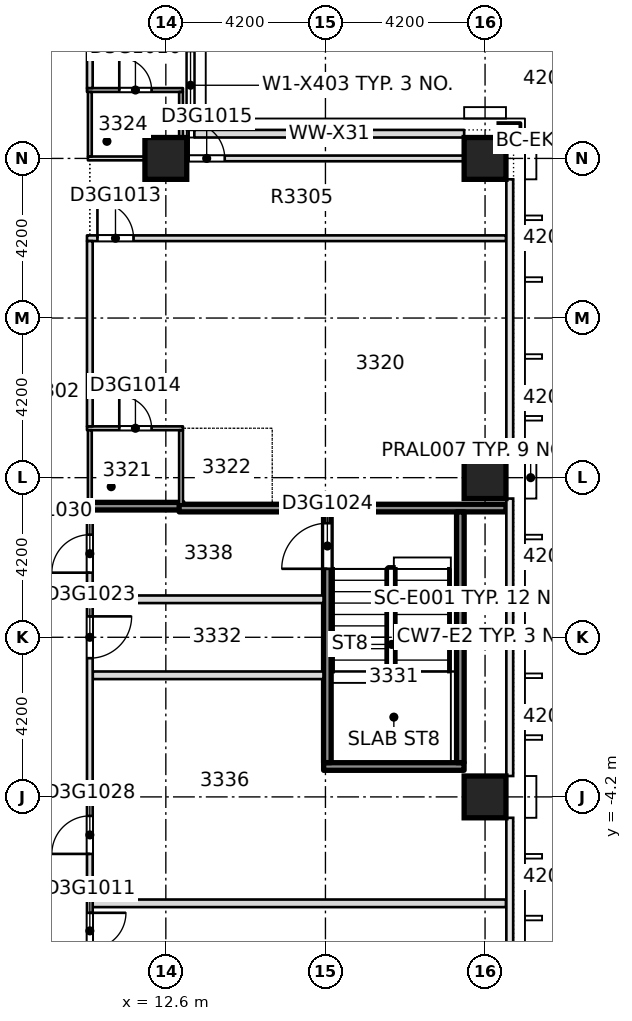
"""IFC4 building model, lengths in metres.
Left out: names, types, materials, properties, quantities, classifications, styles, units other than length and angle.
Written with IfcOpenShell. Run it as: python <this file> out.ifc"""

import sys

from ifc_helpers import new_model, si_unit, direction, frame, frame_2d, origin, origin_2d, place, context, subcontext, project, spatial, rectangle, extrude, element, fill, save


model = new_model("IFC4")
c1 = context("Model", 3, precision=1e-05, world=origin(), true_north=direction((0.0, 1.0)))
c2 = subcontext(c1, "Body", "Model", "MODEL_VIEW")
j1 = project(units=[si_unit("LENGTHUNIT", "METRE"), si_unit("PLANEANGLEUNIT", "RADIAN")], contexts=[c1])
p1 = place(None, origin())
s1 = spatial("IfcSite", under=j1, at=p1, CompositionType="ELEMENT")
p2 = place(p1, origin())
s2 = spatial("IfcBuilding", under=s1, at=p2, CompositionType="ELEMENT")
p3 = place(p2, frame((0.0, 0.0, 133.1)))
s3 = spatial("IfcBuildingStorey", under=s2, at=p3, CompositionType="ELEMENT", Elevation=133.1)
for number, where, z_axis, x_axis in (
    (1, (21.0, -4.2, -0.4), (0.0, 0.0, 1.0), (1.0, 0.0, 0.0)),
    (2, (21.0, 4.2, -0.4), (0.0, 0.0, 1.0), (1.0, 0.0, 0.0)),
    (3, (12.6, 12.6, -0.4), (0.0, 0.0, 1.0), (1.0, 0.0, 0.0)),
    (4, (21.0, 12.6, -0.4), (0.0, 0.0, 1.0), (1.0, 0.0, 0.0)),
):
    element("IfcColumn", number, at=place(p3, frame(where, z_axis=z_axis, x_axis=x_axis)), inside=s3, PredefinedType="COLUMN", context=c2, shape_type="SweptSolid", body=[
        extrude(rectangle(XDim=1.1, YDim=1.1, at=origin_2d()), origin(), (0.0, 0.0, 1.0), 3.45),
    ])
p4 = place(p3, frame((10.675, -7.0, 0.0), z_axis=(0.0, 0.0, 1.0), x_axis=(1.0, 0.0, 0.0)))
e5 = element("IfcWall", 5, at=p4, inside=s3, PredefinedType="PARTITIONING", context=c2, shape_type="SweptSolid", body=[
    extrude(rectangle(XDim=10.875, YDim=0.2, at=frame_2d((5.438, 0.0))), origin(), (0.0, 0.0, 1.0), 3.05),
])
p5 = place(p3, frame((16.752, -3.4, 0.0), z_axis=(0.0, 0.0, 1.0), x_axis=(1.0, 0.0, 0.0)))
e6 = element("IfcWall", 6, at=p5, inside=s3, PredefinedType="SOLIDWALL", context=c2, shape_type="SweptSolid", body=[
    extrude(rectangle(XDim=3.696, YDim=0.2, at=frame_2d((1.848, 0.0))), origin(), (0.0, 0.0, 1.0), 3.05),
])
p6 = place(p3, frame((10.677, -1.0, 0.0), z_axis=(0.0, 0.0, 1.0), x_axis=(1.0, 0.0, 0.0)))
e7 = element("IfcWall", 7, at=p6, inside=s3, PredefinedType="PARTITIONING", context=c2, shape_type="SweptSolid", body=[
    extrude(rectangle(XDim=6.071, YDim=0.2, at=frame_2d((3.036, 0.0))), origin(), (0.0, 0.0, 1.0), 3.05),
])
p7 = place(p3, frame((10.675, 1.0, 0.0), z_axis=(0.0, 0.0, 1.0), x_axis=(1.0, 0.0, 0.0)))
e8 = element("IfcWall", 8, at=p7, inside=s3, PredefinedType="PARTITIONING", context=c2, shape_type="SweptSolid", body=[
    extrude(rectangle(XDim=6.075, YDim=0.2, at=frame_2d((3.038, 0.0))), origin(), (0.0, 0.0, 1.0), 3.05),
])
p8 = place(p3, frame((10.525, 3.45, 0.0), z_axis=(0.0, 0.0, 1.0), x_axis=(1.0, 0.0, 0.0)))
e9 = element("IfcWall", 9, at=p8, inside=s3, PredefinedType="SOLIDWALL", context=c2, shape_type="SweptSolid", body=[
    extrude(rectangle(XDim=2.525, YDim=0.2, at=frame_2d((1.263, 0.0))), origin(), (0.0, 0.0, 1.0), 3.05),
])
p9 = place(p3, frame((12.95, 3.4, 0.0), z_axis=(0.0, 0.0, 1.0), x_axis=(1.0, 0.0, 0.0)))
e10 = element("IfcWall", 10, at=p9, inside=s3, PredefinedType="SOLIDWALL", context=c2, shape_type="SweptSolid", body=[
    extrude(rectangle(XDim=8.6, YDim=0.2, at=frame_2d((4.3, 0.0))), origin(), (0.0, 0.0, 1.0), 3.05),
])
p10 = place(p3, frame((10.525, 5.5, 0.0), z_axis=(0.0, 0.0, 1.0), x_axis=(1.0, 0.0, 0.0)))
e11 = element("IfcWall", 11, at=p10, inside=s3, PredefinedType="PARTITIONING", context=c2, shape_type="SweptSolid", body=[
    extrude(rectangle(XDim=2.525, YDim=0.1, at=frame_2d((1.263, 0.0))), origin(), (0.0, 0.0, 1.0), 3.05),
])
p11 = place(p10, frame((0.85, 0.0, 0.0)))
e12 = element("IfcOpeningElement", 12, at=p11, cuts=e11, PredefinedType="OPENING", context=c2, shape_type="SweptSolid", body=[
    extrude(rectangle(XDim=0.85, YDim=2.1, at=frame_2d((0.425, 1.05))), frame((0.0, 0.06, 0.0), z_axis=(0.0, -1.0, 0.0), x_axis=(1.0, 0.0, 0.0)), (0.0, 0.0, 1.0), 0.12),
])
p12 = place(p3, frame((10.525, 10.5, 0.0), z_axis=(0.0, 0.0, 1.0), x_axis=(1.0, 0.0, 0.0)))
e13 = element("IfcWall", 13, at=p12, inside=s3, PredefinedType="PARTITIONING", context=c2, shape_type="SweptSolid", body=[
    extrude(rectangle(XDim=11.025, YDim=0.15, at=frame_2d((5.513, 0.0))), origin(), (0.0, 0.0, 1.0), 3.05),
])
p13 = place(p12, frame((0.275, 0.0, 0.0)))
e14 = element("IfcOpeningElement", 14, at=p13, cuts=e13, PredefinedType="OPENING", context=c2, shape_type="SweptSolid", body=[
    extrude(rectangle(XDim=0.95, YDim=2.1, at=frame_2d((0.475, 1.05))), frame((0.0, 0.085, 0.0), z_axis=(0.0, -1.0, 0.0), x_axis=(1.0, 0.0, 0.0)), (0.0, 0.0, 1.0), 0.17),
])
p14 = place(p3, frame((10.55, 12.6, 0.0), z_axis=(0.0, 0.0, 1.0), x_axis=(1.0, 0.0, 0.0)))
e15 = element("IfcWall", 15, at=p14, inside=s3, PredefinedType="PARTITIONING", context=c2, shape_type="SweptSolid", body=[
    extrude(rectangle(XDim=2.5, YDim=0.1, at=frame_2d((1.25, 0.0))), origin(), (0.0, 0.0, 1.0), 3.05),
])
p15 = place(p3, frame((12.95, 12.6, 0.0), z_axis=(0.0, 0.0, 1.0), x_axis=(1.0, 0.0, 0.0)))
e16 = element("IfcWall", 16, at=p15, inside=s3, PredefinedType="PARTITIONING", context=c2, shape_type="SweptSolid", body=[
    extrude(rectangle(XDim=0.2, YDim=0.15, at=frame_2d((0.1, 0.0))), origin(), (0.0, 0.0, 1.0), 3.05),
])
p16 = place(p3, frame((10.525, 14.4, 0.0), z_axis=(0.0, 0.0, 1.0), x_axis=(1.0, 0.0, 0.0)))
e17 = element("IfcWall", 17, at=p16, inside=s3, PredefinedType="PARTITIONING", context=c2, shape_type="SweptSolid", body=[
    extrude(rectangle(XDim=2.525, YDim=0.1, at=frame_2d((1.263, 0.0))), origin(), (0.0, 0.0, 1.0), 3.05),
])
p17 = place(p16, frame((0.85, 0.0, 0.0)))
e18 = element("IfcOpeningElement", 18, at=p17, cuts=e17, PredefinedType="OPENING", context=c2, shape_type="SweptSolid", body=[
    extrude(rectangle(XDim=0.85, YDim=2.1, at=frame_2d((0.425, 1.05))), frame((0.0, 0.06, 0.0), z_axis=(0.0, -1.0, 0.0), x_axis=(1.0, 0.0, 0.0)), (0.0, 0.0, 1.0), 0.12),
])
p18 = place(p3, frame((10.6, -10.29, 0.0), z_axis=(0.0, 0.0, 1.0), x_axis=(0.0, 1.0, 0.0)))
e19 = element("IfcWall", 19, at=p18, inside=s3, PredefinedType="PARTITIONING", context=c2, shape_type="SweptSolid", body=[
    extrude(rectangle(XDim=13.64, YDim=0.15, at=frame_2d((6.82, 0.0))), origin(), (0.0, 0.0, 1.0), 3.05),
])
p19 = place(p18, frame((2.09, 0.0, 0.0)))
e20 = element("IfcOpeningElement", 20, at=p19, cuts=e19, PredefinedType="OPENING", context=c2, shape_type="SweptSolid", body=[
    extrude(rectangle(XDim=0.95, YDim=2.1, at=frame_2d((0.475, 1.05))), frame((0.0, 0.085, 0.0), z_axis=(0.0, -1.0, 0.0), x_axis=(1.0, 0.0, 0.0)), (0.0, 0.0, 1.0), 0.17),
])
p20 = place(p18, frame((9.74, 0.0, 0.0)))
e21 = element("IfcOpeningElement", 21, at=p20, cuts=e19, PredefinedType="OPENING", context=c2, shape_type="SweptSolid", body=[
    extrude(rectangle(XDim=1.1, YDim=2.1, at=frame_2d((0.55, 1.05))), frame((0.0, 0.085, 0.0), z_axis=(0.0, -1.0, 0.0), x_axis=(1.0, 0.0, 0.0)), (0.0, 0.0, 1.0), 0.17),
])
p21 = place(p18, frame((4.59, 0.0, 0.0)))
e22 = element("IfcOpeningElement", 22, at=p21, cuts=e19, PredefinedType="OPENING", context=c2, shape_type="SweptSolid", body=[
    extrude(rectangle(XDim=1.0, YDim=2.1, at=frame_2d((0.5, 1.05))), frame((0.0, 0.085, 0.0), z_axis=(0.0, -1.0, 0.0), x_axis=(1.0, 0.0, 0.0)), (0.0, 0.0, 1.0), 0.17),
])
p22 = place(p18, frame((11.99, 0.0, 0.0)))
e23 = element("IfcOpeningElement", 23, at=p22, cuts=e19, PredefinedType="OPENING", context=c2, shape_type="SweptSolid", body=[
    extrude(rectangle(XDim=1.0, YDim=2.1, at=frame_2d((0.5, 1.05))), frame((0.0, 0.085, 0.0), z_axis=(0.0, -1.0, 0.0), x_axis=(1.0, 0.0, 0.0)), (0.0, 0.0, 1.0), 0.17),
])
p23 = place(p3, frame((10.6, 3.45, 0.0), z_axis=(0.0, 0.0, 1.0), x_axis=(0.0, 1.0, 0.0)))
e24 = element("IfcWall", 24, at=p23, inside=s3, PredefinedType="PARTITIONING", context=c2, shape_type="SweptSolid", body=[
    extrude(rectangle(XDim=2.0, YDim=0.1, at=frame_2d((1.0, 0.0))), origin(), (0.0, 0.0, 1.0), 3.05),
])
p24 = place(p3, frame((10.6, 5.55, 0.0), z_axis=(0.0, 0.0, 1.0), x_axis=(0.0, 1.0, 0.0)))
e25 = element("IfcWall", 25, at=p24, inside=s3, PredefinedType="PARTITIONING", context=c2, shape_type="SweptSolid", body=[
    extrude(rectangle(XDim=4.875, YDim=0.15, at=frame_2d((2.438, 0.0))), origin(), (0.0, 0.0, 1.0), 3.05),
])
p25 = place(p3, frame((10.6, 12.65, 0.0), z_axis=(0.0, 0.0, 1.0), x_axis=(0.0, 1.0, 0.0)))
e26 = element("IfcWall", 26, at=p25, inside=s3, PredefinedType="PARTITIONING", context=c2, shape_type="SweptSolid", body=[
    extrude(rectangle(XDim=1.7, YDim=0.1, at=frame_2d((0.85, 0.0))), origin(), (0.0, 0.0, 1.0), 3.05),
])
p26 = place(p3, frame((10.6, 14.45, 0.0), z_axis=(0.0, 0.0, 1.0), x_axis=(0.0, 1.0, 0.0)))
e27 = element("IfcWall", 27, at=p26, inside=s3, PredefinedType="PARTITIONING", context=c2, shape_type="SweptSolid", body=[
    extrude(rectangle(XDim=7.1, YDim=0.15, at=frame_2d((3.55, 0.0))), origin(), (0.0, 0.0, 1.0), 3.05),
])
p27 = place(p3, frame((13.0, 3.5, 0.0), z_axis=(0.0, 0.0, 1.0), x_axis=(0.0, 1.0, 0.0)))
e28 = element("IfcWall", 28, at=p27, inside=s3, PredefinedType="PARTITIONING", context=c2, shape_type="SweptSolid", body=[
    extrude(rectangle(XDim=1.95, YDim=0.1, at=frame_2d((0.975, 0.0))), origin(), (0.0, 0.0, 1.0), 3.05),
])
p28 = place(p3, frame((13.0, 12.675, 0.0), z_axis=(0.0, 0.0, 1.0), x_axis=(0.0, 1.0, 0.0)))
e29 = element("IfcWall", 29, at=p28, inside=s3, PredefinedType="PARTITIONING", context=c2, shape_type="SweptSolid", body=[
    extrude(rectangle(XDim=1.675, YDim=0.1, at=frame_2d((0.837, 0.0))), origin(), (0.0, 0.0, 1.0), 3.05),
])
p29 = place(p3, frame((16.85, -3.298, 0.0), z_axis=(0.0, 0.0, 1.0), x_axis=(0.0, 1.0, 0.0)))
e30 = element("IfcWall", 30, at=p29, inside=s3, PredefinedType="SOLIDWALL", context=c2, shape_type="SweptSolid", body=[
    extrude(rectangle(XDim=6.598, YDim=0.2, at=frame_2d((3.299, 0.0))), origin(), (0.0, 0.0, 1.0), 3.05),
])
p30 = place(p29, frame((5.1, 0.0, 0.0)))
e31 = element("IfcOpeningElement", 31, at=p30, cuts=e30, PredefinedType="OPENING", context=c2, shape_type="SweptSolid", body=[
    extrude(rectangle(XDim=1.2, YDim=2.1, at=frame_2d((0.6, 1.05))), frame((0.0, 0.11, 0.0), z_axis=(0.0, -1.0, 0.0), x_axis=(1.0, 0.0, 0.0)), (0.0, 0.0, 1.0), 0.22),
])
p31 = place(p3, frame((20.35, -3.298, 0.0), z_axis=(0.0, 0.0, 1.0), x_axis=(0.0, 1.0, 0.0)))
e32 = element("IfcWall", 32, at=p31, inside=s3, PredefinedType="SOLIDWALL", context=c2, shape_type="SweptSolid", body=[
    extrude(rectangle(XDim=6.596, YDim=0.2, at=frame_2d((3.298, 0.0))), origin(), (0.0, 0.0, 1.0), 3.05),
])
p32 = place(p3, frame((20.45, 13.25, 0.0), z_axis=(0.0, 0.0, 1.0), x_axis=(-1.0, 0.0, 0.0)))
e33 = element("IfcWall", 33, at=p32, inside=s3, PredefinedType="STANDARD", context=c2, shape_type="SweptSolid", body=[
    extrude(rectangle(XDim=7.1, YDim=0.2, at=frame_2d((3.55, 0.0))), origin(), (0.0, 0.0, 1.0), 3.05),
])
p33 = place(p3, frame((13.25, 13.35, 0.0), z_axis=(0.0, 0.0, 1.0), x_axis=(0.0, 1.0, 0.0)))
e34 = element("IfcWall", 34, at=p33, inside=s3, PredefinedType="STANDARD", context=c2, shape_type="SweptSolid", body=[
    extrude(rectangle(XDim=7.1, YDim=0.2, at=frame_2d((3.55, 0.0))), origin(), (0.0, 0.0, 1.0), 3.05),
])
p34 = place(p33, frame((0.275, 0.0, 0.2)))
e35 = element("IfcOpeningElement", 35, at=p34, cuts=e34, PredefinedType="OPENING", context=c2, shape_type="SweptSolid", body=[
    extrude(rectangle(XDim=1.8, YDim=2.65, at=frame_2d((0.9, 1.325))), frame((0.0, 0.11, 0.0), z_axis=(0.0, -1.0, 0.0), x_axis=(1.0, 0.0, 0.0)), (0.0, 0.0, 1.0), 0.22),
])
p35 = place(p33, frame((3.825, 0.0, 0.2)))
e36 = element("IfcOpeningElement", 36, at=p35, cuts=e34, PredefinedType="OPENING", context=c2, shape_type="SweptSolid", body=[
    extrude(rectangle(XDim=1.8, YDim=2.65, at=frame_2d((0.9, 1.325))), frame((0.0, 0.11, 0.0), z_axis=(0.0, -1.0, 0.0), x_axis=(1.0, 0.0, 0.0)), (0.0, 0.0, 1.0), 0.22),
])
p36 = place(p3, frame((13.15, 12.6, 0.0), z_axis=(0.0, 0.0, 1.0), x_axis=(1.0, 0.0, 0.0)))
e37 = element("IfcWall", 37, at=p36, inside=s3, PredefinedType="PARTITIONING", context=c2, shape_type="SweptSolid", body=[
    extrude(rectangle(XDim=7.3, YDim=0.15, at=frame_2d((3.65, 0.0))), origin(), (0.0, 0.0, 1.0), 2.5),
])
p37 = place(p36, frame((0.05, 0.0, 0.0)))
e38 = element("IfcOpeningElement", 38, at=p37, cuts=e37, PredefinedType="OPENING", context=c2, shape_type="SweptSolid", body=[
    extrude(rectangle(XDim=0.95, YDim=2.1, at=frame_2d((0.475, 1.05))), frame((0.0, 0.085, 0.0), z_axis=(0.0, -1.0, 0.0), x_axis=(1.0, 0.0, 0.0)), (0.0, 0.0, 1.0), 0.17),
])
p38 = place(p3, frame((20.45, 12.6, 0.0), z_axis=(0.0, 0.0, 1.0), x_axis=(1.0, 0.0, 0.0)))
e39 = element("IfcWall", 39, at=p38, inside=s3, PredefinedType="PARTITIONING", context=c2, shape_type="SweptSolid", body=[
    extrude(rectangle(XDim=1.1, YDim=0.15, at=frame_2d((0.55, 0.0))), origin(), (0.0, 0.0, 1.0), 3.05),
])
p39 = place(p19, origin())
e40 = element("IfcDoor", 40, at=p39, inside=s3, OperationType="SINGLE_SWING_LEFT", PredefinedType="DOOR", context=c2, shape_type="SweptSolid", body=[
    extrude(rectangle(XDim=0.95, YDim=2.1, at=frame_2d((0.475, 1.05))), frame((0.0, 0.025, 0.0), z_axis=(0.0, -1.0, 0.0), x_axis=(1.0, 0.0, 0.0)), (0.0, 0.0, 1.0), 0.05),
])
fill(e20, e40)
p40 = place(p13, origin())
e41 = element("IfcDoor", 41, at=p40, inside=s3, OperationType="SINGLE_SWING_RIGHT", PredefinedType="DOOR", context=c2, shape_type="SweptSolid", body=[
    extrude(rectangle(XDim=0.95, YDim=2.1, at=frame_2d((0.475, 1.05))), frame((0.0, 0.025, 0.0), z_axis=(0.0, -1.0, 0.0), x_axis=(1.0, 0.0, 0.0)), (0.0, 0.0, 1.0), 0.05),
])
fill(e14, e41)
p41 = place(p11, origin())
e42 = element("IfcDoor", 42, at=p41, inside=s3, OperationType="SINGLE_SWING_RIGHT", PredefinedType="DOOR", context=c2, shape_type="SweptSolid", body=[
    extrude(rectangle(XDim=0.85, YDim=2.1, at=frame_2d((0.425, 1.05))), frame((0.0, 0.025, 0.0), z_axis=(0.0, -1.0, 0.0), x_axis=(1.0, 0.0, 0.0)), (0.0, 0.0, 1.0), 0.05),
])
fill(e12, e42)
p42 = place(p37, origin())
e43 = element("IfcDoor", 43, at=p42, inside=s3, OperationType="SINGLE_SWING_LEFT", PredefinedType="DOOR", context=c2, shape_type="SweptSolid", body=[
    extrude(rectangle(XDim=0.95, YDim=2.1, at=frame_2d((0.475, 1.05))), frame((0.0, 0.025, 0.0), z_axis=(0.0, -1.0, 0.0), x_axis=(1.0, 0.0, 0.0)), (0.0, 0.0, 1.0), 0.05),
])
fill(e38, e43)
p43 = place(p17, origin())
e44 = element("IfcDoor", 44, at=p43, inside=s3, OperationType="SINGLE_SWING_RIGHT", PredefinedType="DOOR", context=c2, shape_type="SweptSolid", body=[
    extrude(rectangle(XDim=0.85, YDim=2.1, at=frame_2d((0.425, 1.05))), frame((0.0, 0.025, 0.0), z_axis=(0.0, -1.0, 0.0), x_axis=(1.0, 0.0, 0.0)), (0.0, 0.0, 1.0), 0.05),
])
fill(e18, e44)
p44 = place(p20, origin())
e45 = element("IfcDoor", 45, at=p44, inside=s3, OperationType="SINGLE_SWING_LEFT", PredefinedType="DOOR", context=c2, shape_type="SweptSolid", body=[
    extrude(rectangle(XDim=1.1, YDim=2.1, at=frame_2d((0.55, 1.05))), frame((0.0, 0.025, 0.0), z_axis=(0.0, -1.0, 0.0), x_axis=(1.0, 0.0, 0.0)), (0.0, 0.0, 1.0), 0.05),
])
fill(e21, e45)
p45 = place(p30, origin())
e46 = element("IfcDoor", 46, at=p45, inside=s3, OperationType="SINGLE_SWING_LEFT", PredefinedType="DOOR", context=c2, shape_type="SweptSolid", body=[
    extrude(rectangle(XDim=1.2, YDim=2.1, at=frame_2d((0.6, 1.05))), frame((0.0, 0.025, 0.0), z_axis=(0.0, -1.0, 0.0), x_axis=(1.0, 0.0, 0.0)), (0.0, 0.0, 1.0), 0.05),
])
fill(e31, e46)
p46 = place(p21, origin())
e47 = element("IfcDoor", 47, at=p46, inside=s3, OperationType="SINGLE_SWING_RIGHT", PredefinedType="DOOR", context=c2, shape_type="SweptSolid", body=[
    extrude(rectangle(XDim=1.0, YDim=2.1, at=frame_2d((0.5, 1.05))), frame((0.0, 0.025, 0.0), z_axis=(0.0, -1.0, 0.0), x_axis=(1.0, 0.0, 0.0)), (0.0, 0.0, 1.0), 0.05),
])
fill(e22, e47)
p47 = place(p22, origin())
e48 = element("IfcDoor", 48, at=p47, inside=s3, OperationType="SINGLE_SWING_LEFT", PredefinedType="DOOR", context=c2, shape_type="SweptSolid", body=[
    extrude(rectangle(XDim=1.0, YDim=2.1, at=frame_2d((0.5, 1.05))), frame((0.0, 0.025, 0.0), z_axis=(0.0, -1.0, 0.0), x_axis=(1.0, 0.0, 0.0)), (0.0, 0.0, 1.0), 0.05),
])
fill(e23, e48)
p48 = place(p34, origin())
e49 = element("IfcWindow", 49, at=p48, inside=s3, PartitioningType="SINGLE_PANEL", PredefinedType="WINDOW", context=c2, shape_type="SweptSolid", body=[
    extrude(rectangle(XDim=1.8, YDim=2.65, at=frame_2d((0.9, 1.325))), frame((0.0, 0.03, 0.0), z_axis=(0.0, -1.0, 0.0), x_axis=(1.0, 0.0, 0.0)), (0.0, 0.0, 1.0), 0.06),
])
fill(e35, e49)
save(model, sys.argv[1])
